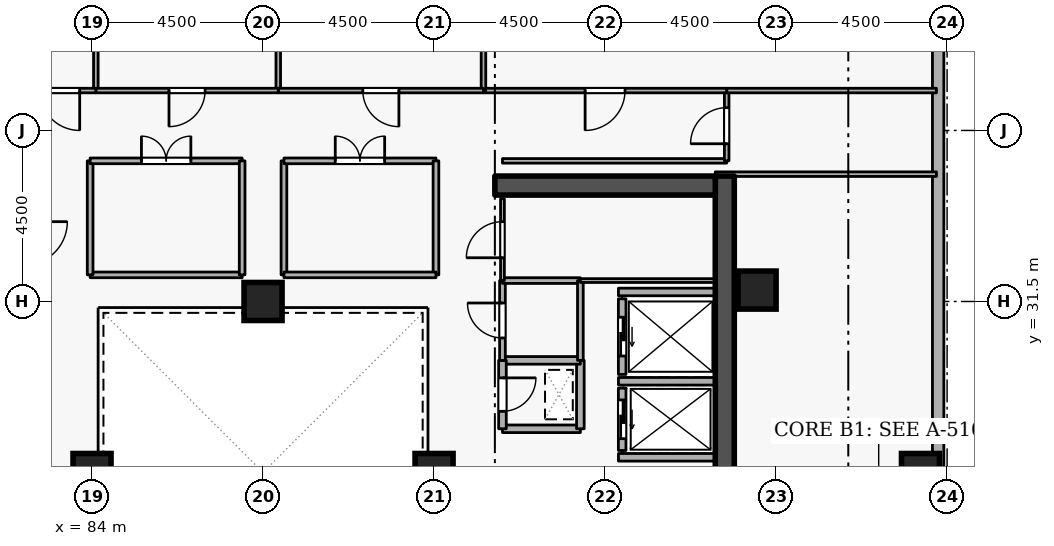
"""IFC4 building model, lengths in metres.
Left out: names, types, materials, properties, quantities, classifications, styles, units other than length and angle.
Written with IfcOpenShell. Run it as: python <this file> out.ifc"""

import sys

from ifc_helpers import new_model, si_unit, direction, frame, frame_2d, origin, origin_2d, place, context, subcontext, project, spatial, rectangle, extrude, element, fill, save


model = new_model("IFC4")
c1 = context("Model", 3, precision=1e-05, world=origin(), true_north=direction((0.0, 1.0)))
c2 = subcontext(c1, "Body", "Model", "MODEL_VIEW")
j1 = project(units=[si_unit("LENGTHUNIT", "METRE"), si_unit("PLANEANGLEUNIT", "RADIAN")], contexts=[c1])
p1 = place(None, origin())
s1 = spatial("IfcSite", under=j1, at=p1, CompositionType="ELEMENT")
p2 = place(p1, origin())
s2 = spatial("IfcBuilding", under=s1, at=p2, CompositionType="ELEMENT")
p3 = place(p2, frame((0.0, 0.0, 225.9)))
s3 = spatial("IfcBuildingStorey", under=s2, at=p3, CompositionType="ELEMENT", Elevation=225.9)
p4 = place(p3, frame((100.65, 19.2, 0.0), z_axis=(0.0, 0.0, 1.0), x_axis=(0.0, 1.0, 0.0)))
e1 = element("IfcWall", 1, at=p4, inside=s3, PredefinedType="SHEAR", context=c2, shape_type="SweptSolid", body=[
    extrude(rectangle(XDim=15.6, YDim=0.5, at=frame_2d((7.8, 0.0))), origin(), (0.0, 0.0, 1.0), 3.6),
])
p5 = place(p3, frame((94.6, 34.55, 0.0), z_axis=(0.0, 0.0, 1.0), x_axis=(1.0, 0.0, 0.0)))
e2 = element("IfcWall", 2, at=p5, inside=s3, PredefinedType="SHEAR", context=c2, shape_type="SweptSolid", body=[
    extrude(rectangle(XDim=5.8, YDim=0.5, at=frame_2d((2.9, 0.0))), origin(), (0.0, 0.0, 1.0), 3.6),
])
for number, where, z_axis, x_axis in (
    (3, (105.8, 27.0, 0.0), (0.0, 0.0, 1.0), (1.0, 0.0, 0.0)),
    (4, (101.5, 31.8, 0.0), (0.0, 0.0, 1.0), (1.0, 0.0, 0.0)),
    (5, (93.0, 27.0, 0.0), (0.0, 0.0, 1.0), (1.0, 0.0, 0.0)),
    (6, (84.0, 27.0, 0.0), (0.0, 0.0, 1.0), (1.0, 0.0, 0.0)),
    (7, (88.5, 31.5, 0.0), (0.0, 0.0, 1.0), (1.0, 0.0, 0.0)),
):
    element("IfcColumn", number, at=place(p3, frame(where, z_axis=z_axis, x_axis=x_axis)), inside=s3, PredefinedType="COLUMN", context=c2, shape_type="SweptSolid", body=[
        extrude(rectangle(XDim=1.0, YDim=1.0, at=origin_2d()), origin(), (0.0, 0.0, 1.0), 3.6),
    ])
p6 = place(p3, frame((106.265, 5.819, 0.0), z_axis=(0.0, 0.0, 1.0), x_axis=(0.0, 1.0, 0.0)))
e8 = element("IfcWall", 8, at=p6, inside=s3, PredefinedType="STANDARD", context=c2, shape_type="SweptSolid", body=[
    extrude(rectangle(XDim=36.363, YDim=0.3, at=frame_2d((18.181, 0.0))), origin(), (0.0, 0.0, 1.0), 2.22),
])
p7 = place(p6, frame((1.8, 0.0, 0.72)))
e9 = element("IfcOpeningElement", 9, at=p7, cuts=e8, PredefinedType="OPENING", context=c2, shape_type="SweptSolid", body=[
    extrude(rectangle(XDim=1.35, YDim=1.05, at=frame_2d((0.675, 0.525))), frame((0.0, 0.16, 0.0), z_axis=(0.0, -1.0, 0.0), x_axis=(1.0, 0.0, 0.0)), (0.0, 0.0, 1.0), 0.32),
])
p8 = place(p3, frame((97.95, 29.22, 0.0), z_axis=(0.0, 0.0, 1.0), x_axis=(0.0, -1.0, 0.0)))
e10 = element("IfcWall", 10, at=p8, inside=s3, PredefinedType="STANDARD", context=c2, shape_type="SweptSolid", body=[
    extrude(rectangle(XDim=1.64, YDim=0.2, at=frame_2d((0.82, 0.0))), origin(), (0.0, 0.0, 1.0), 3.3),
])
p9 = place(p8, frame((0.31, 0.0, 0.0)))
e11 = element("IfcOpeningElement", 11, at=p9, cuts=e10, PredefinedType="OPENING", context=c2, shape_type="SweptSolid", body=[
    extrude(rectangle(XDim=1.02, YDim=2.06, at=frame_2d((0.51, 1.03))), frame((0.0, 0.11, 0.0), z_axis=(0.0, -1.0, 0.0), x_axis=(1.0, 0.0, 0.0)), (0.0, 0.0, 1.0), 0.22),
])
p10 = place(p3, frame((97.95, 31.57, 0.0), z_axis=(0.0, 0.0, 1.0), x_axis=(0.0, -1.0, 0.0)))
e12 = element("IfcWall", 12, at=p10, inside=s3, PredefinedType="STANDARD", context=c2, shape_type="SweptSolid", body=[
    extrude(rectangle(XDim=1.99, YDim=0.2, at=frame_2d((0.995, 0.0))), origin(), (0.0, 0.0, 1.0), 3.3),
])
p11 = place(p10, frame((0.485, 0.0, 0.0)))
e13 = element("IfcOpeningElement", 13, at=p11, cuts=e12, PredefinedType="OPENING", context=c2, shape_type="SweptSolid", body=[
    extrude(rectangle(XDim=1.02, YDim=2.06, at=frame_2d((0.51, 1.03))), frame((0.0, 0.11, 0.0), z_axis=(0.0, -1.0, 0.0), x_axis=(1.0, 0.0, 0.0)), (0.0, 0.0, 1.0), 0.22),
])
p12 = place(p3, frame((97.852, 29.4, 0.0), z_axis=(0.0, 0.0, 1.0), x_axis=(1.0, 0.0, 0.0)))
e14 = element("IfcWall", 14, at=p12, inside=s3, PredefinedType="STANDARD", context=c2, shape_type="SweptSolid", body=[
    extrude(rectangle(XDim=2.536, YDim=0.2, at=frame_2d((1.268, 0.0))), origin(), (0.0, 0.0, 1.0), 3.3),
])
p13 = place(p3, frame((97.852, 27.4, 0.0), z_axis=(0.0, 0.0, 1.0), x_axis=(1.0, 0.0, 0.0)))
e15 = element("IfcWall", 15, at=p13, inside=s3, PredefinedType="STANDARD", context=c2, shape_type="SweptSolid", body=[
    extrude(rectangle(XDim=2.536, YDim=0.2, at=frame_2d((1.268, 0.0))), origin(), (0.0, 0.0, 1.0), 1.785),
])
p14 = place(p3, frame((97.852, 31.75, 0.0), z_axis=(0.0, 0.0, 1.0), x_axis=(1.0, 0.0, 0.0)))
e16 = element("IfcWall", 16, at=p14, inside=s3, PredefinedType="STANDARD", context=c2, shape_type="SweptSolid", body=[
    extrude(rectangle(XDim=2.536, YDim=0.2, at=frame_2d((1.268, 0.0))), origin(), (0.0, 0.0, 1.0), 3.3),
])
p15 = place(p3, frame((94.8, 28.15, 0.0), z_axis=(0.0, 0.0, 1.0), x_axis=(1.0, 0.0, 0.0)))
e17 = element("IfcWall", 17, at=p15, inside=s3, PredefinedType="STANDARD", context=c2, shape_type="SweptSolid", body=[
    extrude(rectangle(XDim=2.05, YDim=0.2, at=frame_2d((1.025, 0.0))), origin(), (0.0, 0.0, 1.0), 3.3),
])
p16 = place(p3, frame((96.85, 28.15, 0.0), z_axis=(0.0, 0.0, 1.0), x_axis=(0.0, 1.0, 0.0)))
e18 = element("IfcWall", 18, at=p16, inside=s3, PredefinedType="STANDARD", context=c2, shape_type="SweptSolid", body=[
    extrude(rectangle(XDim=1.8, YDim=0.2, at=frame_2d((0.9, 0.0))), origin(), (0.0, 0.0, 1.0), 3.3),
])
p17 = place(p3, frame((96.85, 29.95, 0.0), z_axis=(0.0, 0.0, 1.0), x_axis=(-1.0, 0.0, 0.0)))
e19 = element("IfcWall", 19, at=p17, inside=s3, PredefinedType="STANDARD", context=c2, shape_type="SweptSolid", body=[
    extrude(rectangle(XDim=2.05, YDim=0.2, at=frame_2d((1.025, 0.0))), origin(), (0.0, 0.0, 1.0), 3.3),
])
p18 = place(p3, frame((94.8, 29.95, 0.0), z_axis=(0.0, 0.0, 1.0), x_axis=(0.0, -1.0, 0.0)))
e20 = element("IfcWall", 20, at=p18, inside=s3, PredefinedType="STANDARD", context=c2, shape_type="SweptSolid", body=[
    extrude(rectangle(XDim=1.8, YDim=0.2, at=frame_2d((0.9, 0.0))), origin(), (0.0, 0.0, 1.0), 3.3),
])
p19 = place(p18, frame((0.46, 0.0, 0.0)))
e21 = element("IfcOpeningElement", 21, at=p19, cuts=e20, PredefinedType="OPENING", context=c2, shape_type="SweptSolid", body=[
    extrude(rectangle(XDim=0.88, YDim=2.04, at=frame_2d((0.44, 1.02))), frame((0.0, 0.11, 0.0), z_axis=(0.0, -1.0, 0.0), x_axis=(1.0, 0.0, 0.0)), (0.0, 0.0, 1.0), 0.22),
])
p20 = place(p3, frame((94.8, 29.95, 0.0), z_axis=(0.0, 0.0, 1.0), x_axis=(0.0, 1.0, 0.0)))
e22 = element("IfcWall", 22, at=p20, inside=s3, PredefinedType="PARTITIONING", context=c2, shape_type="SweptSolid", body=[
    extrude(rectangle(XDim=2.1, YDim=0.15, at=frame_2d((1.05, 0.0))), origin(), (0.0, 0.0, 1.0), 3.3),
])
p21 = place(p20, frame((0.59, 0.0, 0.0)))
e23 = element("IfcOpeningElement", 23, at=p21, cuts=e22, PredefinedType="OPENING", context=c2, shape_type="SweptSolid", body=[
    extrude(rectangle(XDim=0.92, YDim=2.08, at=frame_2d((0.46, 1.04))), frame((0.0, 0.085, 0.0), z_axis=(0.0, -1.0, 0.0), x_axis=(1.0, 0.0, 0.0)), (0.0, 0.0, 1.0), 0.17),
])
p22 = place(p3, frame((94.8, 32.05, 0.0), z_axis=(0.0, 0.0, 1.0), x_axis=(1.0, 0.0, 0.0)))
e24 = element("IfcWall", 24, at=p22, inside=s3, PredefinedType="PARTITIONING", context=c2, shape_type="SweptSolid", body=[
    extrude(rectangle(XDim=2.05, YDim=0.15, at=frame_2d((1.025, 0.0))), origin(), (0.0, 0.0, 1.0), 3.3),
])
p23 = place(p3, frame((96.85, 32.05, 0.0), z_axis=(0.0, 0.0, 1.0), x_axis=(0.0, -1.0, 0.0)))
e25 = element("IfcWall", 25, at=p23, inside=s3, PredefinedType="PARTITIONING", context=c2, shape_type="SweptSolid", body=[
    extrude(rectangle(XDim=2.1, YDim=0.15, at=frame_2d((1.05, 0.0))), origin(), (0.0, 0.0, 1.0), 3.3),
])
p24 = place(p3, frame((94.8, 32.05, 0.0), z_axis=(0.0, 0.0, 1.0), x_axis=(0.0, 1.0, 0.0)))
e26 = element("IfcWall", 26, at=p24, inside=s3, PredefinedType="PARTITIONING", context=c2, shape_type="SweptSolid", body=[
    extrude(rectangle(XDim=2.15, YDim=0.1, at=frame_2d((1.075, 0.0))), origin(), (0.0, 0.0, 1.0), 3.3),
])
p25 = place(p24, frame((0.6, 0.0, 0.0)))
e27 = element("IfcOpeningElement", 27, at=p25, cuts=e26, PredefinedType="OPENING", context=c2, shape_type="SweptSolid", body=[
    extrude(rectangle(XDim=0.95, YDim=2.1, at=frame_2d((0.475, 1.05))), frame((0.0, 0.06, 0.0), z_axis=(0.0, -1.0, 0.0), x_axis=(1.0, 0.0, 0.0)), (0.0, 0.0, 1.0), 0.12),
])
p26 = place(p3, frame((100.4, 32.05, 0.0), z_axis=(0.0, 0.0, 1.0), x_axis=(-1.0, 0.0, 0.0)))
e28 = element("IfcWall", 28, at=p26, inside=s3, PredefinedType="PARTITIONING", context=c2, shape_type="SweptSolid", body=[
    extrude(rectangle(XDim=3.55, YDim=0.1, at=frame_2d((1.775, 0.0))), origin(), (0.0, 0.0, 1.0), 3.3),
])
p27 = place(p3, frame((94.8, 35.2, 0.0), z_axis=(0.0, 0.0, 1.0), x_axis=(1.0, 0.0, 0.0)))
e29 = element("IfcWall", 29, at=p27, inside=s3, PredefinedType="PARTITIONING", context=c2, shape_type="SweptSolid", body=[
    extrude(rectangle(XDim=5.9, YDim=0.12, at=frame_2d((2.95, 0.0))), origin(), (0.0, 0.0, 1.0), 3.3),
])
p28 = place(p3, frame((100.7, 35.2, 0.0), z_axis=(0.0, 0.0, 1.0), x_axis=(0.0, 1.0, 0.0)))
e30 = element("IfcWall", 30, at=p28, inside=s3, PredefinedType="PARTITIONING", context=c2, shape_type="SweptSolid", body=[
    extrude(rectangle(XDim=1.85, YDim=0.12, at=frame_2d((0.925, 0.0))), origin(), (0.0, 0.0, 1.0), 3.3),
])
p29 = place(p28, frame((0.45, 0.0, 0.0)))
e31 = element("IfcOpeningElement", 31, at=p29, cuts=e30, PredefinedType="OPENING", context=c2, shape_type="SweptSolid", body=[
    extrude(rectangle(XDim=0.95, YDim=2.1, at=frame_2d((0.475, 1.05))), frame((0.0, 0.07, 0.0), z_axis=(0.0, -1.0, 0.0), x_axis=(1.0, 0.0, 0.0)), (0.0, 0.0, 1.0), 0.14),
])
p30 = place(p3, frame((100.7, 37.05, 0.0), z_axis=(0.0, 0.0, 1.0), x_axis=(1.0, 0.0, 0.0)))
e32 = element("IfcWall", 32, at=p30, inside=s3, PredefinedType="PARTITIONING", context=c2, shape_type="SweptSolid", body=[
    extrude(rectangle(XDim=5.52, YDim=0.12, at=frame_2d((2.76, 0.0))), origin(), (0.0, 0.0, 1.0), 3.3),
])
p31 = place(p3, frame((106.22, 34.85, 0.0), z_axis=(0.0, 0.0, 1.0), x_axis=(-1.0, 0.0, 0.0)))
e33 = element("IfcWall", 33, at=p31, inside=s3, PredefinedType="PARTITIONING", context=c2, shape_type="SweptSolid", body=[
    extrude(rectangle(XDim=5.82, YDim=0.12, at=frame_2d((2.91, 0.0))), origin(), (0.0, 0.0, 1.0), 2.505),
])
p32 = place(p3, frame((100.7, 37.05, 0.0), z_axis=(0.0, 0.0, 1.0), x_axis=(-1.0, 0.0, 0.0)))
e34 = element("IfcWall", 34, at=p32, inside=s3, PredefinedType="PARTITIONING", context=c2, shape_type="SweptSolid", body=[
    extrude(rectangle(XDim=6.4, YDim=0.12, at=frame_2d((3.2, 0.0))), origin(), (0.0, 0.0, 1.0), 3.3),
])
p33 = place(p32, frame((2.675, 0.0, 0.0)))
e35 = element("IfcOpeningElement", 35, at=p33, cuts=e34, PredefinedType="OPENING", context=c2, shape_type="SweptSolid", body=[
    extrude(rectangle(XDim=1.05, YDim=2.1, at=frame_2d((0.525, 1.05))), frame((0.0, 0.07, 0.0), z_axis=(0.0, -1.0, 0.0), x_axis=(1.0, 0.0, 0.0)), (0.0, 0.0, 1.0), 0.14),
])
for number, where, z_axis, x_axis in (
    (36, (94.3, 37.05, 0.0), (0.0, 0.0, 1.0), (0.0, 1.0, 0.0)),
    (37, (88.9, 37.05, 0.0), (0.0, 0.0, 1.0), (0.0, 1.0, 0.0)),
):
    element("IfcWall", number, at=place(p3, frame(where, z_axis=z_axis, x_axis=x_axis)), inside=s3, PredefinedType="PARTITIONING", context=c2, shape_type="SweptSolid", body=[
        extrude(rectangle(XDim=7.67, YDim=0.12, at=frame_2d((3.835, 0.0))), origin(), (0.0, 0.0, 1.0), 3.3),
    ])
p34 = place(p3, frame((94.3, 37.05, 0.0), z_axis=(0.0, 0.0, 1.0), x_axis=(-1.0, 0.0, 0.0)))
e38 = element("IfcWall", 38, at=p34, inside=s3, PredefinedType="PARTITIONING", context=c2, shape_type="SweptSolid", body=[
    extrude(rectangle(XDim=5.4, YDim=0.12, at=frame_2d((2.7, 0.0))), origin(), (0.0, 0.0, 1.0), 3.3),
])
p35 = place(p34, frame((2.225, 0.0, 0.0)))
e39 = element("IfcOpeningElement", 39, at=p35, cuts=e38, PredefinedType="OPENING", context=c2, shape_type="SweptSolid", body=[
    extrude(rectangle(XDim=0.95, YDim=2.1, at=frame_2d((0.475, 1.05))), frame((0.0, 0.07, 0.0), z_axis=(0.0, -1.0, 0.0), x_axis=(1.0, 0.0, 0.0)), (0.0, 0.0, 1.0), 0.14),
])
p36 = place(p3, frame((84.1, 37.05, 0.0), z_axis=(0.0, 0.0, 1.0), x_axis=(0.0, 1.0, 0.0)))
e40 = element("IfcWall", 40, at=p36, inside=s3, PredefinedType="PARTITIONING", context=c2, shape_type="SweptSolid", body=[
    extrude(rectangle(XDim=7.67, YDim=0.12, at=frame_2d((3.835, 0.0))), origin(), (0.0, 0.0, 1.0), 3.3),
])
p37 = place(p3, frame((88.9, 37.05, 0.0), z_axis=(0.0, 0.0, 1.0), x_axis=(-1.0, 0.0, 0.0)))
e41 = element("IfcWall", 41, at=p37, inside=s3, PredefinedType="PARTITIONING", context=c2, shape_type="SweptSolid", body=[
    extrude(rectangle(XDim=4.8, YDim=0.12, at=frame_2d((2.4, 0.0))), origin(), (0.0, 0.0, 1.0), 3.3),
])
p38 = place(p37, frame((1.925, 0.0, 0.0)))
e42 = element("IfcOpeningElement", 42, at=p38, cuts=e41, PredefinedType="OPENING", context=c2, shape_type="SweptSolid", body=[
    extrude(rectangle(XDim=0.95, YDim=2.1, at=frame_2d((0.475, 1.05))), frame((0.0, 0.07, 0.0), z_axis=(0.0, -1.0, 0.0), x_axis=(1.0, 0.0, 0.0)), (0.0, 0.0, 1.0), 0.14),
])
p39 = place(p3, frame((84.1, 37.05, 0.0), z_axis=(0.0, 0.0, 1.0), x_axis=(-1.0, 0.0, 0.0)))
e43 = element("IfcWall", 43, at=p39, inside=s3, PredefinedType="PARTITIONING", context=c2, shape_type="SweptSolid", body=[
    extrude(rectangle(XDim=1.9, YDim=0.12, at=frame_2d((0.95, 0.0))), origin(), (0.0, 0.0, 1.0), 3.3),
])
p40 = place(p39, frame((0.425, 0.0, 0.0)))
e44 = element("IfcOpeningElement", 44, at=p40, cuts=e43, PredefinedType="OPENING", context=c2, shape_type="SweptSolid", body=[
    extrude(rectangle(XDim=1.05, YDim=2.1, at=frame_2d((0.525, 1.05))), frame((0.0, 0.07, 0.0), z_axis=(0.0, -1.0, 0.0), x_axis=(1.0, 0.0, 0.0)), (0.0, 0.0, 1.0), 0.14),
])
p41 = place(p3, frame((89.05, 32.2, 0.0), z_axis=(0.0, 0.0, 1.0), x_axis=(0.0, 1.0, 0.0)))
e45 = element("IfcWall", 45, at=p41, inside=s3, PredefinedType="PARTITIONING", context=c2, shape_type="SweptSolid", body=[
    extrude(rectangle(XDim=3.0, YDim=0.15, at=frame_2d((1.5, 0.0))), origin(), (0.0, 0.0, 1.0), 3.3),
])
p42 = place(p3, frame((89.05, 35.2, 0.0), z_axis=(0.0, 0.0, 1.0), x_axis=(1.0, 0.0, 0.0)))
e46 = element("IfcWall", 46, at=p42, inside=s3, PredefinedType="PARTITIONING", context=c2, shape_type="SweptSolid", body=[
    extrude(rectangle(XDim=4.0, YDim=0.15, at=frame_2d((2.0, 0.0))), origin(), (0.0, 0.0, 1.0), 3.3),
])
p43 = place(p42, frame((1.35, 0.0, 0.0)))
e47 = element("IfcOpeningElement", 47, at=p43, cuts=e46, PredefinedType="OPENING", context=c2, shape_type="SweptSolid", body=[
    extrude(rectangle(XDim=1.3, YDim=2.12, at=frame_2d((0.65, 1.06))), frame((0.0, 0.085, 0.0), z_axis=(0.0, -1.0, 0.0), x_axis=(1.0, 0.0, 0.0)), (0.0, 0.0, 1.0), 0.17),
])
p44 = place(p3, frame((93.05, 35.2, 0.0), z_axis=(0.0, 0.0, 1.0), x_axis=(0.0, -1.0, 0.0)))
e48 = element("IfcWall", 48, at=p44, inside=s3, PredefinedType="PARTITIONING", context=c2, shape_type="SweptSolid", body=[
    extrude(rectangle(XDim=3.0, YDim=0.15, at=frame_2d((1.5, 0.0))), origin(), (0.0, 0.0, 1.0), 3.3),
])
for number, where, z_axis, x_axis in (
    (49, (93.05, 32.2, 0.0), (0.0, 0.0, 1.0), (-1.0, 0.0, 0.0)),
    (50, (87.95, 32.2, 0.0), (0.0, 0.0, 1.0), (-1.0, 0.0, 0.0)),
):
    element("IfcWall", number, at=place(p3, frame(where, z_axis=z_axis, x_axis=x_axis)), inside=s3, PredefinedType="PARTITIONING", context=c2, shape_type="SweptSolid", body=[
        extrude(rectangle(XDim=4.0, YDim=0.15, at=frame_2d((2.0, 0.0))), origin(), (0.0, 0.0, 1.0), 3.3),
    ])
p45 = place(p3, frame((83.95, 32.2, 0.0), z_axis=(0.0, 0.0, 1.0), x_axis=(0.0, 1.0, 0.0)))
e51 = element("IfcWall", 51, at=p45, inside=s3, PredefinedType="PARTITIONING", context=c2, shape_type="SweptSolid", body=[
    extrude(rectangle(XDim=3.0, YDim=0.15, at=frame_2d((1.5, 0.0))), origin(), (0.0, 0.0, 1.0), 3.3),
])
p46 = place(p3, frame((83.95, 35.2, 0.0), z_axis=(0.0, 0.0, 1.0), x_axis=(1.0, 0.0, 0.0)))
e52 = element("IfcWall", 52, at=p46, inside=s3, PredefinedType="PARTITIONING", context=c2, shape_type="SweptSolid", body=[
    extrude(rectangle(XDim=4.0, YDim=0.15, at=frame_2d((2.0, 0.0))), origin(), (0.0, 0.0, 1.0), 3.3),
])
p47 = place(p46, frame((1.35, 0.0, 0.0)))
e53 = element("IfcOpeningElement", 53, at=p47, cuts=e52, PredefinedType="OPENING", context=c2, shape_type="SweptSolid", body=[
    extrude(rectangle(XDim=1.3, YDim=2.12, at=frame_2d((0.65, 1.06))), frame((0.0, 0.085, 0.0), z_axis=(0.0, -1.0, 0.0), x_axis=(1.0, 0.0, 0.0)), (0.0, 0.0, 1.0), 0.17),
])
p48 = place(p3, frame((87.95, 35.2, 0.0), z_axis=(0.0, 0.0, 1.0), x_axis=(0.0, -1.0, 0.0)))
e54 = element("IfcWall", 54, at=p48, inside=s3, PredefinedType="PARTITIONING", context=c2, shape_type="SweptSolid", body=[
    extrude(rectangle(XDim=3.0, YDim=0.15, at=frame_2d((1.5, 0.0))), origin(), (0.0, 0.0, 1.0), 3.3),
])
p49 = place(p9, origin())
e55 = element("IfcDoor", 55, at=p49, inside=s3, OperationType="SLIDING_TO_LEFT", PredefinedType="DOOR", context=c2, shape_type="SweptSolid", body=[
    extrude(rectangle(XDim=1.02, YDim=2.06, at=frame_2d((0.51, 1.03))), frame((0.0, 0.025, 0.0), z_axis=(0.0, -1.0, 0.0), x_axis=(1.0, 0.0, 0.0)), (0.0, 0.0, 1.0), 0.05),
])
fill(e11, e55)
p50 = place(p11, origin())
e56 = element("IfcDoor", 56, at=p50, inside=s3, OperationType="SLIDING_TO_LEFT", PredefinedType="DOOR", context=c2, shape_type="SweptSolid", body=[
    extrude(rectangle(XDim=1.02, YDim=2.06, at=frame_2d((0.51, 1.03))), frame((0.0, 0.025, 0.0), z_axis=(0.0, -1.0, 0.0), x_axis=(1.0, 0.0, 0.0)), (0.0, 0.0, 1.0), 0.05),
])
fill(e13, e56)
p51 = place(p19, origin())
e57 = element("IfcDoor", 57, at=p51, inside=s3, OperationType="SINGLE_SWING_LEFT", PredefinedType="DOOR", context=c2, shape_type="SweptSolid", body=[
    extrude(rectangle(XDim=0.88, YDim=2.04, at=frame_2d((0.44, 1.02))), frame((0.0, 0.025, 0.0), z_axis=(0.0, -1.0, 0.0), x_axis=(1.0, 0.0, 0.0)), (0.0, 0.0, 1.0), 0.05),
])
fill(e21, e57)
p52 = place(p21, origin())
e58 = element("IfcDoor", 58, at=p52, inside=s3, OperationType="SINGLE_SWING_RIGHT", PredefinedType="DOOR", context=c2, shape_type="SweptSolid", body=[
    extrude(rectangle(XDim=0.92, YDim=2.08, at=frame_2d((0.46, 1.04))), frame((0.0, 0.025, 0.0), z_axis=(0.0, -1.0, 0.0), x_axis=(1.0, 0.0, 0.0)), (0.0, 0.0, 1.0), 0.05),
])
fill(e23, e58)
p53 = place(p25, origin())
e59 = element("IfcDoor", 59, at=p53, inside=s3, OperationType="SINGLE_SWING_LEFT", PredefinedType="DOOR", context=c2, shape_type="SweptSolid", body=[
    extrude(rectangle(XDim=0.95, YDim=2.1, at=frame_2d((0.475, 1.05))), frame((0.0, 0.025, 0.0), z_axis=(0.0, -1.0, 0.0), x_axis=(1.0, 0.0, 0.0)), (0.0, 0.0, 1.0), 0.05),
])
fill(e27, e59)
p54 = place(p29, origin())
e60 = element("IfcDoor", 60, at=p54, inside=s3, OperationType="SINGLE_SWING_LEFT", PredefinedType="DOOR", context=c2, shape_type="SweptSolid", body=[
    extrude(rectangle(XDim=0.95, YDim=2.1, at=frame_2d((0.475, 1.05))), frame((0.0, 0.025, 0.0), z_axis=(0.0, -1.0, 0.0), x_axis=(1.0, 0.0, 0.0)), (0.0, 0.0, 1.0), 0.05),
])
fill(e31, e60)
p55 = place(p33, origin())
e61 = element("IfcDoor", 61, at=p55, inside=s3, OperationType="SINGLE_SWING_RIGHT", PredefinedType="DOOR", context=c2, shape_type="SweptSolid", body=[
    extrude(rectangle(XDim=1.05, YDim=2.1, at=frame_2d((0.525, 1.05))), frame((0.0, 0.025, 0.0), z_axis=(0.0, -1.0, 0.0), x_axis=(1.0, 0.0, 0.0)), (0.0, 0.0, 1.0), 0.05),
])
fill(e35, e61)
p56 = place(p35, origin())
e62 = element("IfcDoor", 62, at=p56, inside=s3, OperationType="SINGLE_SWING_LEFT", PredefinedType="DOOR", context=c2, shape_type="SweptSolid", body=[
    extrude(rectangle(XDim=0.95, YDim=2.1, at=frame_2d((0.475, 1.05))), frame((0.0, 0.025, 0.0), z_axis=(0.0, -1.0, 0.0), x_axis=(1.0, 0.0, 0.0)), (0.0, 0.0, 1.0), 0.05),
])
fill(e39, e62)
p57 = place(p38, origin())
e63 = element("IfcDoor", 63, at=p57, inside=s3, OperationType="SINGLE_SWING_RIGHT", PredefinedType="DOOR", context=c2, shape_type="SweptSolid", body=[
    extrude(rectangle(XDim=0.95, YDim=2.1, at=frame_2d((0.475, 1.05))), frame((0.0, 0.025, 0.0), z_axis=(0.0, -1.0, 0.0), x_axis=(1.0, 0.0, 0.0)), (0.0, 0.0, 1.0), 0.05),
])
fill(e42, e63)
p58 = place(p40, origin())
e64 = element("IfcDoor", 64, at=p58, inside=s3, OperationType="SINGLE_SWING_LEFT", PredefinedType="DOOR", context=c2, shape_type="SweptSolid", body=[
    extrude(rectangle(XDim=1.05, YDim=2.1, at=frame_2d((0.525, 1.05))), frame((0.0, 0.025, 0.0), z_axis=(0.0, -1.0, 0.0), x_axis=(1.0, 0.0, 0.0)), (0.0, 0.0, 1.0), 0.05),
])
fill(e44, e64)
p59 = place(p43, origin())
e65 = element("IfcDoor", 65, at=p59, inside=s3, OperationType="DOUBLE_DOOR_SINGLE_SWING", PredefinedType="DOOR", context=c2, shape_type="SweptSolid", body=[
    extrude(rectangle(XDim=1.3, YDim=2.12, at=frame_2d((0.65, 1.06))), frame((0.0, 0.025, 0.0), z_axis=(0.0, -1.0, 0.0), x_axis=(1.0, 0.0, 0.0)), (0.0, 0.0, 1.0), 0.05),
])
fill(e47, e65)
p60 = place(p47, origin())
e66 = element("IfcDoor", 66, at=p60, inside=s3, OperationType="DOUBLE_DOOR_SINGLE_SWING", PredefinedType="DOOR", context=c2, shape_type="SweptSolid", body=[
    extrude(rectangle(XDim=1.3, YDim=2.12, at=frame_2d((0.65, 1.06))), frame((0.0, 0.025, 0.0), z_axis=(0.0, -1.0, 0.0), x_axis=(1.0, 0.0, 0.0)), (0.0, 0.0, 1.0), 0.05),
])
fill(e53, e66)
save(model, sys.argv[1])
